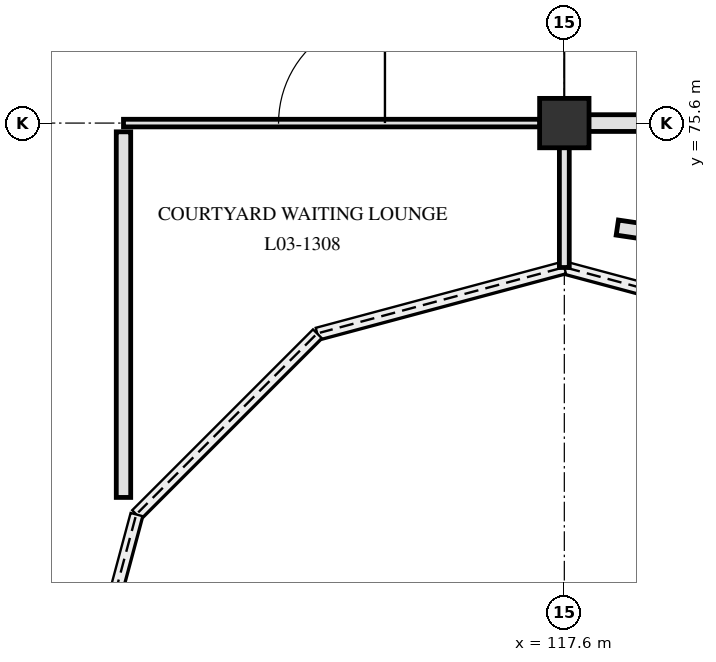
"""IFC4 building model, lengths in metres.
Left out: names, types, materials, properties, quantities, classifications, styles, units other than length and angle.
Written with IfcOpenShell. Run it as: python <this file> out.ifc"""

import sys

from ifc_helpers import new_model, si_unit, direction, frame, frame_2d, origin, origin_2d, place, context, subcontext, project, spatial, rectangle, circle, extrude, element, fill, save


model = new_model("IFC4")
c1 = context("Model", 3, precision=1e-05, world=origin(), true_north=direction((0.0, 1.0)))
c2 = subcontext(c1, "Body", "Model", "MODEL_VIEW")
j1 = project(units=[si_unit("LENGTHUNIT", "METRE"), si_unit("PLANEANGLEUNIT", "RADIAN")], contexts=[c1])
p1 = place(None, origin())
s1 = spatial("IfcSite", under=j1, at=p1, CompositionType="ELEMENT")
p2 = place(p1, origin())
s2 = spatial("IfcBuilding", under=s1, at=p2, CompositionType="ELEMENT")
p3 = place(p2, frame((0.0, 0.0, 14.4)))
s3 = spatial("IfcBuildingStorey", under=s2, at=p3, CompositionType="ELEMENT", Elevation=14.4)
p4 = place(p3, frame((117.6, 75.6, 0.0), z_axis=(0.0, 0.0, 1.0), x_axis=(1.0, 0.0, 0.0)))
e1 = element("IfcColumn", 1, at=p4, inside=s3, PredefinedType="COLUMN", context=c2, shape_type="SweptSolid", body=[
    extrude(circle(Radius=0.325, at=origin_2d()), origin(), (0.0, 0.0, 1.0), 4.2),
])
p5 = place(p3, frame((118.972, 74.125, 4.18), z_axis=(0.0, 0.0, 1.0), x_axis=(-0.989168835608, 0.146782201447, 0.0)))
e2 = element("IfcWall", 2, at=p5, inside=s3, PredefinedType="PARAPET", context=c2, shape_type="SweptSolid", body=[
    extrude(rectangle(XDim=0.682, YDim=0.2, at=frame_2d((0.341, 0.0))), origin(), (0.0, 0.0, 1.0), 1.17),
])
p6 = place(p3, frame((111.8, 75.6, 0.0), z_axis=(0.0, 0.0, 1.0), x_axis=(1.0, 0.0, 0.0)))
e3 = element("IfcWall", 3, at=p6, inside=s3, PredefinedType="PARTITIONING", context=c2, shape_type="SweptSolid", body=[
    extrude(rectangle(XDim=5.48, YDim=0.1, at=frame_2d((2.74, 0.0))), origin(), (0.0, 0.0, 1.0), 3.29),
])
p7 = place(p6, frame((2.04, 0.0, 0.0)))
e4 = element("IfcOpeningElement", 4, at=p7, cuts=e3, PredefinedType="OPENING", context=c2, shape_type="SweptSolid", body=[
    extrude(rectangle(XDim=1.4, YDim=2.2, at=frame_2d((0.7, 1.1))), frame((0.0, 0.06, 0.0), z_axis=(0.0, -1.0, 0.0), x_axis=(1.0, 0.0, 0.0)), (0.0, 0.0, 1.0), 0.12),
])
p8 = place(p3, frame((117.92, 75.6, 0.0), z_axis=(0.0, 0.0, 1.0), x_axis=(1.0, 0.0, 0.0)))
e5 = element("IfcWall", 5, at=p8, inside=s3, PredefinedType="PARTITIONING", context=c2, shape_type="SweptSolid", body=[
    extrude(rectangle(XDim=7.76, YDim=0.22, at=frame_2d((3.88, 0.0))), origin(), (0.0, 0.0, 1.0), 3.29),
])
p9 = place(p8, frame((3.11, 0.0, 0.0)))
e6 = element("IfcOpeningElement", 6, at=p9, cuts=e5, PredefinedType="OPENING", context=c2, shape_type="SweptSolid", body=[
    extrude(rectangle(XDim=1.54, YDim=2.24, at=frame_2d((0.77, 1.12))), frame((0.0, 0.12, 0.0), z_axis=(0.0, -1.0, 0.0), x_axis=(1.0, 0.0, 0.0)), (0.0, 0.0, 1.0), 0.24),
])
p10 = place(p3, frame((111.8, 70.675, 0.0), z_axis=(0.0, 0.0, 1.0), x_axis=(0.0, 1.0, 0.0)))
e7 = element("IfcWall", 7, at=p10, inside=s3, PredefinedType="PARTITIONING", context=c2, shape_type="SweptSolid", body=[
    extrude(rectangle(XDim=4.81, YDim=0.19, at=frame_2d((2.405, 0.0))), origin(), (0.0, 0.0, 1.0), 3.29),
])
p11 = place(p3, frame((117.6, 73.7, 0.0), z_axis=(0.0, 0.0, 1.0), x_axis=(0.0, 1.0, 0.0)))
e8 = element("IfcWall", 8, at=p11, inside=s3, PredefinedType="PARTITIONING", context=c2, shape_type="SweptSolid", body=[
    extrude(rectangle(XDim=1.58, YDim=0.13, at=frame_2d((0.79, 0.0))), origin(), (0.0, 0.0, 1.0), 3.89),
])
p12 = place(p7, origin())
e9 = element("IfcDoor", 9, at=p12, inside=s3, OperationType="SINGLE_SWING_RIGHT", PredefinedType="DOOR", context=c2, shape_type="SweptSolid", body=[
    extrude(rectangle(XDim=1.4, YDim=2.2, at=frame_2d((0.7, 1.1))), frame((0.0, 0.025, 0.0), z_axis=(0.0, -1.0, 0.0), x_axis=(1.0, 0.0, 0.0)), (0.0, 0.0, 1.0), 0.05),
])
fill(e4, e9)
save(model, sys.argv[1])
